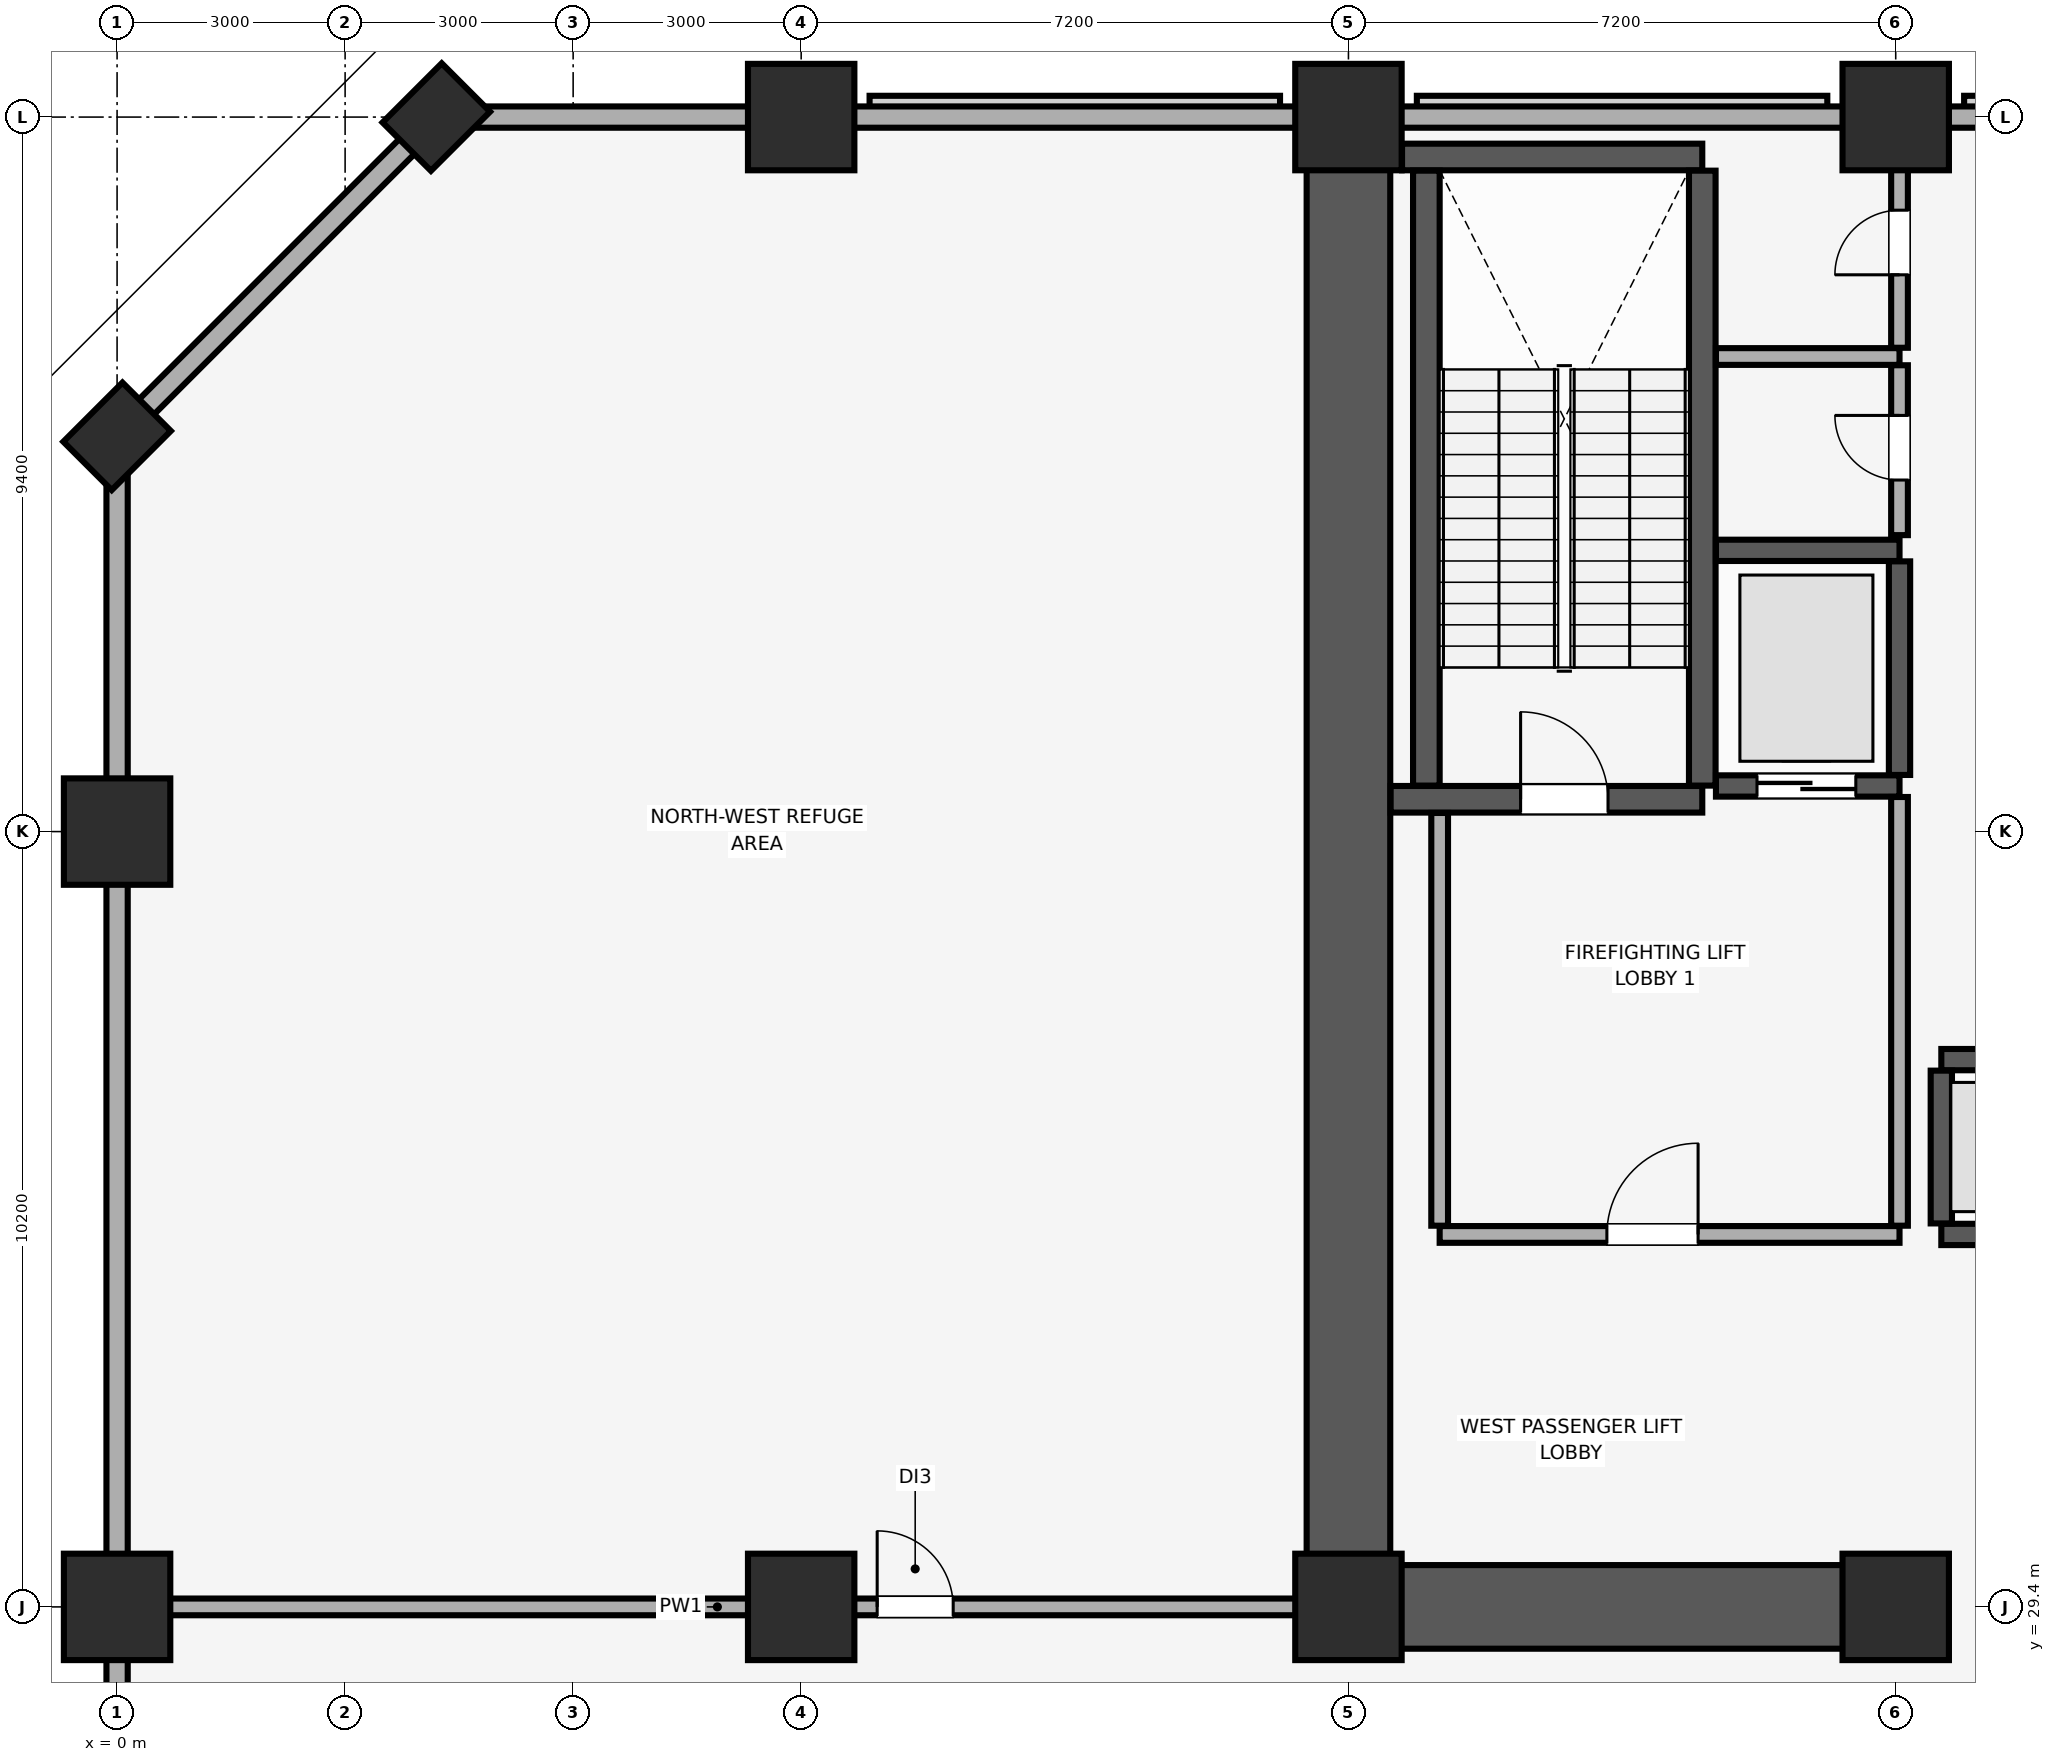
"""IFC4 building model, lengths in metres.
Left out: names, types, materials, properties, quantities, classifications, styles, units other than length and angle.
Written with IfcOpenShell. Run it as: python <this file> out.ifc"""

import sys

from ifc_helpers import new_model, si_unit, direction, frame, frame_2d, origin, origin_2d, place, context, subcontext, project, spatial, rectangle, extrude, element, fill, save


model = new_model("IFC4")
c1 = context("Model", 3, precision=1e-05, world=origin(), true_north=direction((0.0, 1.0)))
c2 = subcontext(c1, "Body", "Model", "MODEL_VIEW")
j1 = project(units=[si_unit("LENGTHUNIT", "METRE"), si_unit("PLANEANGLEUNIT", "RADIAN")], contexts=[c1])
p1 = place(None, origin())
s1 = spatial("IfcSite", under=j1, at=p1, CompositionType="ELEMENT")
p2 = place(p1, origin())
s2 = spatial("IfcBuilding", under=s1, at=p2, CompositionType="ELEMENT")
p3 = place(p2, frame((0.0, 0.0, 80.15)))
s3 = spatial("IfcBuildingStorey", under=s2, at=p3, CompositionType="ELEMENT", Elevation=80.15)
for number, where, z_axis, x_axis in (
    (1, (0.0, 29.4, 0.0), (0.0, 0.0, 1.0), (1.0, 0.0, 0.0)),
    (2, (0.0, 39.6, 0.0), (0.0, 0.0, 1.0), (1.0, 0.0, 0.0)),
):
    element("IfcColumn", number, at=place(p3, frame(where, z_axis=z_axis, x_axis=x_axis)), inside=s3, PredefinedType="COLUMN", context=c2, shape_type="SweptSolid", body=[
        extrude(rectangle(XDim=1.4, YDim=1.4, at=origin_2d()), origin(), (0.0, 0.0, 1.0), 5.16),
    ])
for number, where, z_axis, x_axis in (
    (3, (4.2, 49.0, 0.0), (0.0, 0.0, 1.0), (0.707, 0.707, 0.0)),
    (4, (0.0, 44.8, 0.0), (0.0, 0.0, 1.0), (0.707, 0.707, 0.0)),
):
    element("IfcColumn", number, at=place(p3, frame(where, z_axis=z_axis, x_axis=x_axis)), inside=s3, PredefinedType="PILASTER", context=c2, shape_type="SweptSolid", body=[
        extrude(rectangle(XDim=1.1, YDim=0.9, at=origin_2d()), origin(), (0.0, 0.0, 1.0), 5.16),
    ])
for number, where, z_axis, x_axis in (
    (5, (9.0, 29.4, 0.0), (0.0, 0.0, 1.0), (1.0, 0.0, 0.0)),
    (6, (9.0, 49.0, 0.0), (0.0, 0.0, 1.0), (1.0, 0.0, 0.0)),
    (7, (16.2, 29.4, 0.0), (0.0, 0.0, 1.0), (1.0, 0.0, 0.0)),
    (8, (16.2, 49.0, 0.0), (0.0, 0.0, 1.0), (1.0, 0.0, 0.0)),
    (9, (23.4, 29.4, 0.0), (0.0, 0.0, 1.0), (1.0, 0.0, 0.0)),
    (10, (23.4, 49.0, 0.0), (0.0, 0.0, 1.0), (1.0, 0.0, 0.0)),
):
    element("IfcColumn", number, at=place(p3, frame(where, z_axis=z_axis, x_axis=x_axis)), inside=s3, PredefinedType="COLUMN", context=c2, shape_type="SweptSolid", body=[
        extrude(rectangle(XDim=1.4, YDim=1.4, at=origin_2d()), origin(), (0.0, 0.0, 1.0), 5.16),
    ])
p4 = place(p3, frame((79.8, 49.0, 0.0), z_axis=(0.0, 0.0, 1.0), x_axis=(-1.0, 0.0, 0.0)))
e11 = element("IfcWall", 11, at=p4, inside=s3, PredefinedType="SOLIDWALL", context=c2, shape_type="SweptSolid", body=[
    extrude(rectangle(XDim=75.6, YDim=0.28, at=frame_2d((37.8, 0.0))), origin(), (0.0, 0.0, 1.0), 4.21),
])
p5 = place(p3, frame((4.2, 49.0, 0.0), z_axis=(0.0, 0.0, 1.0), x_axis=(-0.707106781187, -0.707106781187, 0.0)))
e12 = element("IfcWall", 12, at=p5, inside=s3, PredefinedType="SOLIDWALL", context=c2, shape_type="SweptSolid", body=[
    extrude(rectangle(XDim=5.94, YDim=0.28, at=frame_2d((2.97, 0.0))), origin(), (0.0, 0.0, 1.0), 4.21),
])
p6 = place(p3, frame((0.0, 44.8, 0.0), z_axis=(0.0, 0.0, 1.0), x_axis=(0.0, -1.0, 0.0)))
e13 = element("IfcWall", 13, at=p6, inside=s3, PredefinedType="SOLIDWALL", context=c2, shape_type="SweptSolid", body=[
    extrude(rectangle(XDim=40.6, YDim=0.28, at=frame_2d((20.3, 0.0))), origin(), (0.0, 0.0, 1.0), 4.21),
])
p7 = place(p3, frame((16.2, 29.4, 0.0), z_axis=(0.0, 0.0, 1.0), x_axis=(0.0, 1.0, 0.0)))
e14 = element("IfcWall", 14, at=p7, inside=s3, PredefinedType="SHEAR", context=c2, shape_type="SweptSolid", body=[
    extrude(rectangle(XDim=19.2, YDim=1.1, at=frame_2d((9.6, 0.0))), origin(), (0.0, 0.0, 1.0), 5.16),
])
p8 = place(p3, frame((16.755, 29.4, 0.0), z_axis=(0.0, 0.0, 1.0), x_axis=(1.0, 0.0, 0.0)))
e15 = element("IfcWall", 15, at=p8, inside=s3, PredefinedType="SHEAR", context=c2, shape_type="SweptSolid", body=[
    extrude(rectangle(XDim=6.845, YDim=1.1, at=frame_2d((3.423, 0.0))), origin(), (0.0, 0.0, 1.0), 5.16),
])
p9 = place(p3, frame((16.755, 40.025, 0.0), z_axis=(0.0, 0.0, 1.0), x_axis=(1.0, 0.0, 0.0)))
e16 = element("IfcWall", 16, at=p9, inside=s3, PredefinedType="SHEAR", context=c2, shape_type="SweptSolid", body=[
    extrude(rectangle(XDim=4.1, YDim=0.35, at=frame_2d((2.05, 0.0))), origin(), (0.0, 0.0, 1.0), 5.16),
])
p10 = place(p9, frame((1.71, 0.0, 0.0)))
e17 = element("IfcOpeningElement", 17, at=p10, cuts=e16, PredefinedType="OPENING", context=c2, shape_type="SweptSolid", body=[
    extrude(rectangle(XDim=1.15, YDim=2.15, at=frame_2d((0.575, 1.075))), frame((0.0, 0.185, 0.0), z_axis=(0.0, -1.0, 0.0), x_axis=(1.0, 0.0, 0.0)), (0.0, 0.0, 1.0), 0.37),
])
p11 = place(p3, frame((16.905, 48.475, 0.0), z_axis=(0.0, 0.0, 1.0), x_axis=(1.0, 0.0, 0.0)))
e18 = element("IfcWall", 18, at=p11, inside=s3, PredefinedType="SHEAR", context=c2, shape_type="SweptSolid", body=[
    extrude(rectangle(XDim=3.95, YDim=0.35, at=frame_2d((1.975, 0.0))), origin(), (0.0, 0.0, 1.0), 5.16),
])
for number, where, z_axis, x_axis in (
    (19, (17.225, 40.205, 0.0), (0.0, 0.0, 1.0), (0.0, 1.0, 0.0)),
    (20, (20.855, 40.205, 0.0), (0.0, 0.0, 1.0), (0.0, 1.0, 0.0)),
):
    element("IfcWall", number, at=place(p3, frame(where, z_axis=z_axis, x_axis=x_axis)), inside=s3, PredefinedType="SHEAR", context=c2, shape_type="SweptSolid", body=[
        extrude(rectangle(XDim=8.09, YDim=0.35, at=frame_2d((4.045, 0.0))), origin(), (0.0, 0.0, 1.0), 5.16),
    ])
p12 = place(p3, frame((24.0, 34.3, 0.0), z_axis=(0.0, 0.0, 1.0), x_axis=(1.0, 0.0, 0.0)))
e21 = element("IfcWall", 21, at=p12, inside=s3, PredefinedType="SHEAR", context=c2, shape_type="SweptSolid", body=[
    extrude(rectangle(XDim=2.3, YDim=0.28, at=frame_2d((1.15, 0.0))), origin(), (0.0, 0.0, 1.0), 5.16),
])
p13 = place(p12, frame((0.6, 0.0, 0.0)))
e22 = element("IfcOpeningElement", 22, at=p13, cuts=e21, PredefinedType="OPENING", context=c2, shape_type="SweptSolid", body=[
    extrude(rectangle(XDim=1.1, YDim=2.2, at=frame_2d((0.55, 1.1))), frame((0.0, 0.15, 0.0), z_axis=(0.0, -1.0, 0.0), x_axis=(1.0, 0.0, 0.0)), (0.0, 0.0, 1.0), 0.3),
])
p14 = place(p3, frame((24.0, 36.6, 0.0), z_axis=(0.0, 0.0, 1.0), x_axis=(1.0, 0.0, 0.0)))
e23 = element("IfcWall", 23, at=p14, inside=s3, PredefinedType="SHEAR", context=c2, shape_type="SweptSolid", body=[
    extrude(rectangle(XDim=2.3, YDim=0.28, at=frame_2d((1.15, 0.0))), origin(), (0.0, 0.0, 1.0), 5.16),
])
p15 = place(p3, frame((24.0, 34.445, 0.0), z_axis=(0.0, 0.0, 1.0), x_axis=(0.0, 1.0, 0.0)))
e24 = element("IfcWall", 24, at=p15, inside=s3, PredefinedType="SHEAR", context=c2, shape_type="SweptSolid", body=[
    extrude(rectangle(XDim=2.01, YDim=0.28, at=frame_2d((1.005, 0.0))), origin(), (0.0, 0.0, 1.0), 5.16),
])
p16 = place(p3, frame((21.035, 40.2, 0.0), z_axis=(0.0, 0.0, 1.0), x_axis=(1.0, 0.0, 0.0)))
e25 = element("IfcWall", 25, at=p16, inside=s3, PredefinedType="SHEAR", context=c2, shape_type="SweptSolid", body=[
    extrude(rectangle(XDim=2.415, YDim=0.28, at=frame_2d((1.208, 0.0))), origin(), (0.0, 0.0, 1.0), 5.16),
])
p17 = place(p16, frame((0.54, 0.0, 0.0)))
e26 = element("IfcOpeningElement", 26, at=p17, cuts=e25, PredefinedType="OPENING", context=c2, shape_type="SweptSolid", body=[
    extrude(rectangle(XDim=1.3, YDim=2.3, at=frame_2d((0.65, 1.15))), frame((0.0, 0.15, 0.0), z_axis=(0.0, -1.0, 0.0), x_axis=(1.0, 0.0, 0.0)), (0.0, 0.0, 1.0), 0.3),
])
p18 = place(p3, frame((21.035, 43.3, 0.0), z_axis=(0.0, 0.0, 1.0), x_axis=(1.0, 0.0, 0.0)))
e27 = element("IfcWall", 27, at=p18, inside=s3, PredefinedType="SHEAR", context=c2, shape_type="SweptSolid", body=[
    extrude(rectangle(XDim=2.415, YDim=0.28, at=frame_2d((1.208, 0.0))), origin(), (0.0, 0.0, 1.0), 5.16),
])
p19 = place(p3, frame((23.45, 40.345, 0.0), z_axis=(0.0, 0.0, 1.0), x_axis=(0.0, 1.0, 0.0)))
e28 = element("IfcWall", 28, at=p19, inside=s3, PredefinedType="SHEAR", context=c2, shape_type="SweptSolid", body=[
    extrude(rectangle(XDim=2.81, YDim=0.28, at=frame_2d((1.405, 0.0))), origin(), (0.0, 0.0, 1.0), 5.16),
])
p20 = place(p3, frame((17.4, 34.3, 0.0), z_axis=(0.0, 0.0, 1.0), x_axis=(1.0, 0.0, 0.0)))
e29 = element("IfcWall", 29, at=p20, inside=s3, PredefinedType="PARTITIONING", context=c2, shape_type="SweptSolid", body=[
    extrude(rectangle(XDim=6.05, YDim=0.22, at=frame_2d((3.025, 0.0))), origin(), (0.0, 0.0, 1.0), 5.16),
])
p21 = place(p20, frame((2.2, 0.0, 0.0)))
e30 = element("IfcOpeningElement", 30, at=p21, cuts=e29, PredefinedType="OPENING", context=c2, shape_type="SweptSolid", body=[
    extrude(rectangle(XDim=1.2, YDim=2.15, at=frame_2d((0.6, 1.075))), frame((0.0, 0.12, 0.0), z_axis=(0.0, -1.0, 0.0), x_axis=(1.0, 0.0, 0.0)), (0.0, 0.0, 1.0), 0.24),
])
p22 = place(p3, frame((17.4, 34.415, 0.0), z_axis=(0.0, 0.0, 1.0), x_axis=(0.0, 1.0, 0.0)))
e31 = element("IfcWall", 31, at=p22, inside=s3, PredefinedType="PARTITIONING", context=c2, shape_type="SweptSolid", body=[
    extrude(rectangle(XDim=5.43, YDim=0.22, at=frame_2d((2.715, 0.0))), origin(), (0.0, 0.0, 1.0), 5.16),
])
p23 = place(p3, frame((23.45, 34.415, 0.0), z_axis=(0.0, 0.0, 1.0), x_axis=(0.0, 1.0, 0.0)))
e32 = element("IfcWall", 32, at=p23, inside=s3, PredefinedType="PARTITIONING", context=c2, shape_type="SweptSolid", body=[
    extrude(rectangle(XDim=5.64, YDim=0.22, at=frame_2d((2.82, 0.0))), origin(), (0.0, 0.0, 1.0), 5.16),
])
p24 = place(p3, frame((21.035, 45.85, 0.0), z_axis=(0.0, 0.0, 1.0), x_axis=(1.0, 0.0, 0.0)))
e33 = element("IfcWall", 33, at=p24, inside=s3, PredefinedType="PARTITIONING", context=c2, shape_type="SweptSolid", body=[
    extrude(rectangle(XDim=2.415, YDim=0.22, at=frame_2d((1.208, 0.0))), origin(), (0.0, 0.0, 1.0), 5.16),
])
p25 = place(p3, frame((23.45, 43.5, 0.0), z_axis=(0.0, 0.0, 1.0), x_axis=(0.0, 1.0, 0.0)))
e34 = element("IfcWall", 34, at=p25, inside=s3, PredefinedType="PARTITIONING", context=c2, shape_type="SweptSolid", body=[
    extrude(rectangle(XDim=2.235, YDim=0.22, at=frame_2d((1.118, 0.0))), origin(), (0.0, 0.0, 1.0), 5.16),
])
p26 = place(p25, frame((0.725, 0.0, 0.0)))
e35 = element("IfcOpeningElement", 35, at=p26, cuts=e34, PredefinedType="OPENING", context=c2, shape_type="SweptSolid", body=[
    extrude(rectangle(XDim=0.85, YDim=2.1, at=frame_2d((0.425, 1.05))), frame((0.0, 0.12, 0.0), z_axis=(0.0, -1.0, 0.0), x_axis=(1.0, 0.0, 0.0)), (0.0, 0.0, 1.0), 0.24),
])
p27 = place(p3, frame((23.45, 45.965, 0.0), z_axis=(0.0, 0.0, 1.0), x_axis=(0.0, 1.0, 0.0)))
e36 = element("IfcWall", 36, at=p27, inside=s3, PredefinedType="PARTITIONING", context=c2, shape_type="SweptSolid", body=[
    extrude(rectangle(XDim=2.885, YDim=0.22, at=frame_2d((1.442, 0.0))), origin(), (0.0, 0.0, 1.0), 5.16),
])
p28 = place(p27, frame((0.96, 0.0, 0.0)))
e37 = element("IfcOpeningElement", 37, at=p28, cuts=e36, PredefinedType="OPENING", context=c2, shape_type="SweptSolid", body=[
    extrude(rectangle(XDim=0.85, YDim=2.1, at=frame_2d((0.425, 1.05))), frame((0.0, 0.12, 0.0), z_axis=(0.0, -1.0, 0.0), x_axis=(1.0, 0.0, 0.0)), (0.0, 0.0, 1.0), 0.24),
])
p29 = place(p3, frame((0.15, 29.4, 0.0), z_axis=(0.0, 0.0, 1.0), x_axis=(1.0, 0.0, 0.0)))
e38 = element("IfcWall", 38, at=p29, inside=s3, PredefinedType="PARTITIONING", context=c2, shape_type="SweptSolid", body=[
    extrude(rectangle(XDim=15.495, YDim=0.22, at=frame_2d((7.748, 0.0))), origin(), (0.0, 0.0, 1.0), 4.51),
])
p30 = place(p29, frame((9.85, 0.0, 0.0)))
e39 = element("IfcOpeningElement", 39, at=p30, cuts=e38, PredefinedType="OPENING", context=c2, shape_type="SweptSolid", body=[
    extrude(rectangle(XDim=1.0, YDim=2.15, at=frame_2d((0.5, 1.075))), frame((0.0, 0.12, 0.0), z_axis=(0.0, -1.0, 0.0), x_axis=(1.0, 0.0, 0.0)), (0.0, 0.0, 1.0), 0.24),
])
p31 = place(p10, origin())
e40 = element("IfcDoor", 40, at=p31, inside=s3, OperationType="SINGLE_SWING_LEFT", PredefinedType="DOOR", context=c2, shape_type="SweptSolid", body=[
    extrude(rectangle(XDim=1.15, YDim=2.15, at=frame_2d((0.575, 1.075))), frame((0.0, 0.025, 0.0), z_axis=(0.0, -1.0, 0.0), x_axis=(1.0, 0.0, 0.0)), (0.0, 0.0, 1.0), 0.05),
])
fill(e17, e40)
p32 = place(p17, origin())
e41 = element("IfcDoor", 41, at=p32, inside=s3, OperationType="DOUBLE_DOOR_SLIDING", PredefinedType="DOOR", context=c2, shape_type="SweptSolid", body=[
    extrude(rectangle(XDim=1.3, YDim=2.3, at=frame_2d((0.65, 1.15))), frame((0.0, 0.025, 0.0), z_axis=(0.0, -1.0, 0.0), x_axis=(1.0, 0.0, 0.0)), (0.0, 0.0, 1.0), 0.05),
])
fill(e26, e41)
p33 = place(p21, origin())
e42 = element("IfcDoor", 42, at=p33, inside=s3, OperationType="SINGLE_SWING_RIGHT", PredefinedType="DOOR", context=c2, shape_type="SweptSolid", body=[
    extrude(rectangle(XDim=1.2, YDim=2.15, at=frame_2d((0.6, 1.075))), frame((0.0, 0.025, 0.0), z_axis=(0.0, -1.0, 0.0), x_axis=(1.0, 0.0, 0.0)), (0.0, 0.0, 1.0), 0.05),
])
fill(e30, e42)
p34 = place(p26, origin())
e43 = element("IfcDoor", 43, at=p34, inside=s3, OperationType="SINGLE_SWING_RIGHT", PredefinedType="DOOR", context=c2, shape_type="SweptSolid", body=[
    extrude(rectangle(XDim=0.85, YDim=2.1, at=frame_2d((0.425, 1.05))), frame((0.0, 0.025, 0.0), z_axis=(0.0, -1.0, 0.0), x_axis=(1.0, 0.0, 0.0)), (0.0, 0.0, 1.0), 0.05),
])
fill(e35, e43)
p35 = place(p28, origin())
e44 = element("IfcDoor", 44, at=p35, inside=s3, OperationType="SINGLE_SWING_LEFT", PredefinedType="DOOR", context=c2, shape_type="SweptSolid", body=[
    extrude(rectangle(XDim=0.85, YDim=2.1, at=frame_2d((0.425, 1.05))), frame((0.0, 0.025, 0.0), z_axis=(0.0, -1.0, 0.0), x_axis=(1.0, 0.0, 0.0)), (0.0, 0.0, 1.0), 0.05),
])
fill(e37, e44)
p36 = place(p30, origin())
e45 = element("IfcDoor", 45, at=p36, inside=s3, OperationType="SINGLE_SWING_LEFT", PredefinedType="DOOR", context=c2, shape_type="SweptSolid", body=[
    extrude(rectangle(XDim=1.0, YDim=2.15, at=frame_2d((0.5, 1.075))), frame((0.0, 0.025, 0.0), z_axis=(0.0, -1.0, 0.0), x_axis=(1.0, 0.0, 0.0)), (0.0, 0.0, 1.0), 0.05),
])
fill(e39, e45)
save(model, sys.argv[1])
